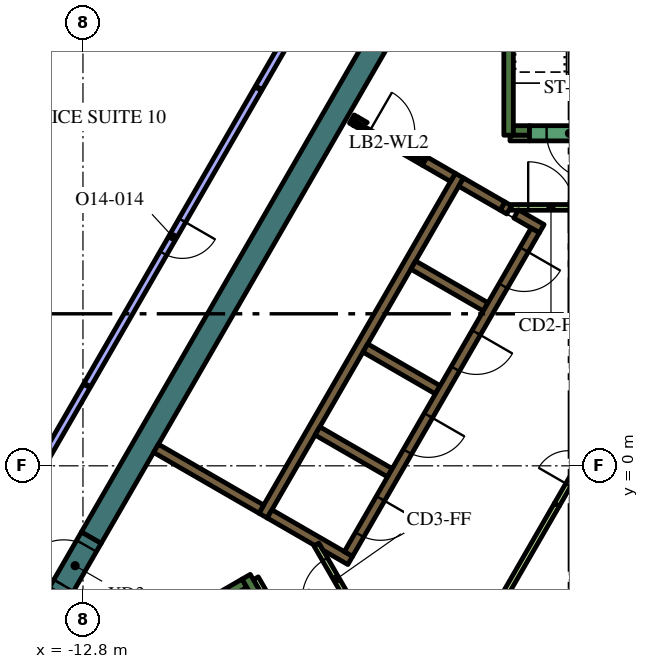
"""IFC4 building model, lengths in metres.
Left out: names, types, materials, properties, quantities, classifications, styles, units other than length and angle.
Written with IfcOpenShell. Run it as: python <this file> out.ifc"""

import sys

from ifc_helpers import new_model, si_unit, direction, frame, frame_2d, origin, place, context, subcontext, project, spatial, polyline, rectangle, outline, extrude, element, fill, save


model = new_model("IFC4")
c1 = context("Model", 3, precision=1e-05, world=origin(), true_north=direction((0.0, 1.0)))
c2 = subcontext(c1, "Body", "Model", "MODEL_VIEW")
j1 = project(units=[si_unit("LENGTHUNIT", "METRE"), si_unit("PLANEANGLEUNIT", "RADIAN")], contexts=[c1])
p1 = place(None, origin())
s1 = spatial("IfcSite", under=j1, at=p1, CompositionType="ELEMENT")
p2 = place(p1, origin())
s2 = spatial("IfcBuilding", under=s1, at=p2, CompositionType="ELEMENT")
p3 = place(p2, frame((0.0, 0.0, 313.2)))
s3 = spatial("IfcBuildingStorey", under=s2, at=p3, CompositionType="ELEMENT", Elevation=313.2)
p4 = place(p3, frame((-13.432, -3.364, 0.0), z_axis=(0.0, 0.0, 1.0), x_axis=(-0.499960127962, -0.866048422692, 0.0)))
e1 = element("IfcWall", 1, at=p4, inside=s3, PredefinedType="SOLIDWALL", context=c2, shape_type="SweptSolid", body=[
    extrude(rectangle(XDim=2.934, YDim=0.6, at=frame_2d((1.467, 0.0))), origin(), (0.0, 0.0, 1.0), 4.2),
])
p5 = place(p3, frame((-12.582, -1.892, 0.0), z_axis=(0.0, 0.0, 1.0), x_axis=(0.500003640647, 0.866023301845, 0.0)))
e2 = element("IfcWall", 2, at=p5, inside=s3, PredefinedType="SOLIDWALL", context=c2, shape_type="SweptSolid", body=[
    extrude(rectangle(XDim=15.858, YDim=0.6, at=frame_2d((7.929, 0.0))), origin(), (0.0, 0.0, 1.0), 4.2),
])
p6 = place(p3, frame((-1.6, 8.7, 0.0), z_axis=(0.0, 0.0, 1.0), x_axis=(0.0, 1.0, 0.0)))
e3 = element("IfcWall", 3, at=p6, inside=s3, PredefinedType="SOLIDWALL", context=c2, shape_type="SweptSolid", body=[
    extrude(rectangle(XDim=7.05, YDim=0.25, at=frame_2d((3.525, 0.0))), origin(), (0.0, 0.0, 1.0), 4.2),
])
p7 = place(p3, frame((-1.475, 8.825, 0.0), z_axis=(0.0, 0.0, 1.0), x_axis=(1.0, 0.0, 0.0)))
e4 = element("IfcWall", 4, at=p7, inside=s3, PredefinedType="SOLIDWALL", context=c2, shape_type="SweptSolid", body=[
    extrude(rectangle(XDim=0.425, YDim=0.25, at=frame_2d((0.212, 0.0))), origin(), (0.0, 0.0, 1.0), 4.2),
])
p8 = place(p3, frame((-14.44, -6.49, 0.0), z_axis=(0.0, 0.0, 1.0), x_axis=(0.866022966069, 0.500004222222, 0.0)))
e5 = element("IfcWall", 5, at=p8, inside=s3, PredefinedType="SOLIDWALL", context=c2, shape_type="SweptSolid", body=[
    extrude(rectangle(XDim=6.8, YDim=0.25, at=frame_2d((3.4, 0.0))), origin(), (0.0, 0.0, 1.0), 4.2),
])
p9 = place(p3, frame((-8.168, -3.503, 0.0), z_axis=(0.0, 0.0, 1.0), x_axis=(-0.499952099219, 0.866053057547, 0.0)))
e6 = element("IfcWall", 6, at=p9, inside=s3, PredefinedType="SOLIDWALL", context=c2, shape_type="SweptSolid", body=[
    extrude(rectangle(XDim=0.675, YDim=0.25, at=frame_2d((0.337, 0.0))), origin(), (0.0, 0.0, 1.0), 4.2),
])
p10 = place(p3, frame((-8.06, -1.311, 0.0), z_axis=(0.0, 0.0, 1.0), x_axis=(0.50000273126, 0.866023826885, 0.0)))
e7 = element("IfcWall", 7, at=p10, inside=s3, PredefinedType="SOLIDWALL", context=c2, shape_type="SweptSolid", body=[
    extrude(rectangle(XDim=10.33, YDim=0.25, at=frame_2d((5.165, 0.0))), origin(), (0.0, 0.0, 1.0), 4.2),
])
p11 = place(p3, frame((-1.758, 6.835, 0.0), z_axis=(0.0, 0.0, 1.0), x_axis=(0.865982457891, -0.500074377092, 0.0)))
e8 = element("IfcWall", 8, at=p11, inside=s3, PredefinedType="SOLIDWALL", context=c2, shape_type="SweptSolid", body=[
    extrude(rectangle(XDim=0.2, YDim=0.25, at=frame_2d((0.1, 0.0))), origin(), (0.0, 0.0, 1.0), 4.2),
])
p12 = place(p3, frame((-1.76, 6.836, 0.0), z_axis=(0.0, 0.0, 1.0), x_axis=(-0.865952863304, 0.500125622755, 0.0)))
e9 = element("IfcWall", 9, at=p12, inside=s3, PredefinedType="SOLIDWALL", context=c2, shape_type="SweptSolid", body=[
    extrude(rectangle(XDim=1.258, YDim=0.25, at=frame_2d((0.629, 0.0))), origin(), (0.0, 0.0, 1.0), 4.2),
])
p13 = place(p3, frame((-0.728, 6.24, 0.0), z_axis=(0.0, 0.0, 1.0), x_axis=(-0.865955664968, 0.500120771724, 0.0)))
e10 = element("IfcWall", 10, at=p13, inside=s3, PredefinedType="SOLIDWALL", context=c2, shape_type="SweptSolid", body=[
    extrude(rectangle(XDim=0.778, YDim=0.25, at=frame_2d((0.389, 0.0))), origin(), (0.0, 0.0, 1.0), 4.2),
])
for number, where, z_axis, x_axis in (
    (11, (-2.204, 4.182, 0.0), (0.0, 0.0, 1.0), (-0.866, 0.5, 0.0)),
    (12, (-5.369, 3.1, 0.0), (0.0, 0.0, 1.0), (0.866, -0.5, 0.0)),
    (13, (-4.724, -0.182, 0.0), (0.0, 0.0, 1.0), (-0.866, 0.5, 0.0)),
):
    element("IfcWall", number, at=place(p3, frame(where, z_axis=z_axis, x_axis=x_axis)), inside=s3, PredefinedType="SOLIDWALL", context=c2, shape_type="SweptSolid", body=[
        extrude(rectangle(XDim=2.2, YDim=0.25, at=frame_2d((1.1, 0.0))), origin(), (0.0, 0.0, 1.0), 4.2),
    ])
p14 = place(p3, origin())
e14 = element("IfcWall", 14, at=p14, inside=s3, PredefinedType="SOLIDWALL", context=c2, shape_type="SweptSolid", body=[
    extrude(outline(polyline([(-5.922, -2.257), (-5.922, -2.257), (-5.705, -2.382), (-5.83, -2.598), (-6.483, -2.221), (-6.591, -2.033), (-6.591, -2.033), (-6.7, -2.096), (-7.952, -1.373), (-7.827, -1.156), (-5.922, -2.257)])), origin(), (0.0, 0.0, 1.0), 4.2),
])
p15 = place(p3, frame((-8.106, -1.14, 0.0), z_axis=(0.0, 0.0, 1.0), x_axis=(-0.866008981251, 0.500028443584, 0.0)))
e15 = element("IfcWall", 15, at=p15, inside=s3, PredefinedType="SOLIDWALL", context=c2, shape_type="SweptSolid", body=[
    extrude(rectangle(XDim=3.2, YDim=0.25, at=frame_2d((1.6, 0.0))), origin(), (0.0, 0.0, 1.0), 4.2),
])
p16 = place(p3, frame((-5.725, 9.125, 0.0), z_axis=(0.0, 0.0, 1.0), x_axis=(0.866185586049, -0.49972245349, 0.0)))
e16 = element("IfcWall", 16, at=p16, inside=s3, PredefinedType="SOLIDWALL", context=c2, shape_type="SweptSolid", body=[
    extrude(rectangle(XDim=0.11, YDim=0.25, at=frame_2d((0.055, 0.0))), origin(), (0.0, 0.0, 1.0), 4.2),
])
p17 = place(p3, frame((-3.066, 7.59, 0.0), z_axis=(0.0, 0.0, 1.0), x_axis=(-0.866081358704, 0.49990307071, 0.0)))
e17 = element("IfcWall", 17, at=p17, inside=s3, PredefinedType="SOLIDWALL", context=c2, shape_type="SweptSolid", body=[
    extrude(rectangle(XDim=0.858, YDim=0.25, at=frame_2d((0.429, 0.0))), origin(), (0.0, 0.0, 1.0), 4.2),
])
e18 = element("IfcWall", 18, at=p14, inside=s3, PredefinedType="SOLIDWALL", context=c2, shape_type="SweptSolid", body=[
    extrude(outline(polyline([(-3.748, 8.128), (-3.813, 8.015), (-4.027, 8.139), (-4.017, 8.156), (-4.008, 8.173), (-4.0, 8.192), (-3.995, 8.21), (-3.991, 8.23), (-3.99, 8.25), (-3.99, 8.268), (-3.748, 8.128)])), origin(), (0.0, 0.0, 1.0), 4.2),
])
e19 = element("IfcWall", 19, at=p14, inside=s3, PredefinedType="SOLIDWALL", context=c2, shape_type="SweptSolid", body=[
    extrude(outline(polyline([(-5.689, 8.96), (-5.69, 8.961), (-5.565, 9.177), (-5.319, 9.035), (-5.335, 9.026), (-5.351, 9.015), (-5.366, 9.002), (-5.379, 8.988), (-5.392, 8.972), (-5.402, 8.956), (-5.412, 8.939), (-5.629, 9.064), (-5.629, 9.064), (-5.689, 8.96)])), origin(), (0.0, 0.0, 1.0), 4.2),
])
for number, where, z_axis, x_axis in (
    (20, (-8.252, -2.958, 0.0), (0.0, 0.0, 1.0), (0.5, -0.866, 0.0)),
    (21, (-1.564, 8.625, 0.0), (0.0, 0.0, 1.0), (1.0, 0.0, 0.0)),
):
    element("IfcWall", number, at=place(p3, frame(where, z_axis=z_axis, x_axis=x_axis)), inside=s3, PredefinedType="PARTITIONING", context=c2, shape_type="SweptSolid", body=[
        extrude(rectangle(XDim=0.514, YDim=0.15, at=frame_2d((0.257, 0.0))), origin(), (0.0, 0.0, 1.0), 3.55),
    ])
p18 = place(p3, frame((-1.887, -3.718, 0.0), z_axis=(0.0, 0.0, 1.0), x_axis=(0.500043732237, 0.866000153493, 0.0)))
e22 = element("IfcWall", 22, at=p18, inside=s3, PredefinedType="PARTITIONING", context=c2, shape_type="SweptSolid", body=[
    extrude(rectangle(XDim=3.114, YDim=0.15, at=frame_2d((1.557, 0.0))), origin(), (0.0, 0.0, 1.0), 3.55),
])
p19 = place(p3, frame((-0.898, 6.194, 0.0), z_axis=(0.0, 0.0, 1.0), x_axis=(-0.499996202215, -0.866027596426, 0.0)))
e23 = element("IfcWall", 23, at=p19, inside=s3, PredefinedType="SOLIDWALL", context=c2, shape_type="SweptSolid", body=[
    extrude(rectangle(XDim=9.83, YDim=0.25, at=frame_2d((4.915, 0.0))), origin(), (0.0, 0.0, 1.0), 4.2),
])
p20 = place(p19, frame((0.585, 0.0, 0.0)))
e24 = element("IfcOpeningElement", 24, at=p20, cuts=e23, PredefinedType="OPENING", context=c2, shape_type="SweptSolid", body=[
    extrude(rectangle(XDim=1.1, YDim=2.1, at=frame_2d((0.55, 1.05))), frame((0.0, 0.135, 0.0), z_axis=(0.0, -1.0, 0.0), x_axis=(1.0, 0.0, 0.0)), (0.0, 0.0, 1.0), 0.27),
])
p21 = place(p19, frame((3.105, 0.0, 0.0)))
e25 = element("IfcOpeningElement", 25, at=p21, cuts=e23, PredefinedType="OPENING", context=c2, shape_type="SweptSolid", body=[
    extrude(rectangle(XDim=1.1, YDim=2.1, at=frame_2d((0.55, 1.05))), frame((0.0, 0.135, 0.0), z_axis=(0.0, -1.0, 0.0), x_axis=(1.0, 0.0, 0.0)), (0.0, 0.0, 1.0), 0.27),
])
p22 = place(p19, frame((5.625, 0.0, 0.0)))
e26 = element("IfcOpeningElement", 26, at=p22, cuts=e23, PredefinedType="OPENING", context=c2, shape_type="SweptSolid", body=[
    extrude(rectangle(XDim=1.1, YDim=2.1, at=frame_2d((0.55, 1.05))), frame((0.0, 0.135, 0.0), z_axis=(0.0, -1.0, 0.0), x_axis=(1.0, 0.0, 0.0)), (0.0, 0.0, 1.0), 0.27),
])
p23 = place(p19, frame((8.145, 0.0, 0.0)))
e27 = element("IfcOpeningElement", 27, at=p23, cuts=e23, PredefinedType="OPENING", context=c2, shape_type="SweptSolid", body=[
    extrude(rectangle(XDim=1.1, YDim=2.1, at=frame_2d((0.55, 1.05))), frame((0.0, 0.135, 0.0), z_axis=(0.0, -1.0, 0.0), x_axis=(1.0, 0.0, 0.0)), (0.0, 0.0, 1.0), 0.27),
])
p24 = place(p3, frame((1.05, 8.75, 0.0), z_axis=(0.0, 0.0, 1.0), x_axis=(-1.0, 0.0, 0.0)))
e28 = element("IfcWall", 28, at=p24, inside=s3, PredefinedType="SOLIDWALL", context=c2, shape_type="SweptSolid", body=[
    extrude(rectangle(XDim=2.1, YDim=0.4, at=frame_2d((1.05, 0.0))), origin(), (0.0, 0.0, 1.0), 4.2),
])
p25 = place(p24, frame((0.45, 0.0, 0.0)))
e29 = element("IfcOpeningElement", 29, at=p25, cuts=e28, PredefinedType="OPENING", context=c2, shape_type="SweptSolid", body=[
    extrude(rectangle(XDim=1.2, YDim=2.1, at=frame_2d((0.6, 1.05))), frame((0.0, 0.21, 0.0), z_axis=(0.0, -1.0, 0.0), x_axis=(1.0, 0.0, 0.0)), (0.0, 0.0, 1.0), 0.42),
])
p26 = place(p3, frame((-0.33, -1.022, 0.0), z_axis=(0.0, 0.0, 1.0), x_axis=(0.500027713859, 0.866009402589, 0.0)))
e30 = element("IfcWall", 30, at=p26, inside=s3, PredefinedType="PARTITIONING", context=c2, shape_type="SweptSolid", body=[
    extrude(rectangle(XDim=2.1, YDim=0.15, at=frame_2d((1.05, 0.0))), origin(), (0.0, 0.0, 1.0), 3.55),
])
p27 = place(p26, frame((0.6, 0.0, 0.0)))
e31 = element("IfcOpeningElement", 31, at=p27, cuts=e30, PredefinedType="OPENING", context=c2, shape_type="SweptSolid", body=[
    extrude(rectangle(XDim=0.9, YDim=2.1, at=frame_2d((0.45, 1.05))), frame((0.0, 0.085, 0.0), z_axis=(0.0, -1.0, 0.0), x_axis=(1.0, 0.0, 0.0)), (0.0, 0.0, 1.0), 0.17),
])
p28 = place(p3, frame((-1.534, 6.8, 0.0), z_axis=(0.0, 0.0, 1.0), x_axis=(1.0, 0.0, 0.0)))
e32 = element("IfcWall", 32, at=p28, inside=s3, PredefinedType="PARTITIONING", context=c2, shape_type="SweptSolid", body=[
    extrude(rectangle(XDim=2.1, YDim=0.15, at=frame_2d((1.05, 0.0))), origin(), (0.0, 0.0, 1.0), 3.55),
])
p29 = place(p28, frame((0.45, 0.0, 0.0)))
e33 = element("IfcOpeningElement", 33, at=p29, cuts=e32, PredefinedType="OPENING", context=c2, shape_type="SweptSolid", body=[
    extrude(rectangle(XDim=1.2, YDim=2.1, at=frame_2d((0.6, 1.05))), frame((0.0, 0.085, 0.0), z_axis=(0.0, -1.0, 0.0), x_axis=(1.0, 0.0, 0.0)), (0.0, 0.0, 1.0), 0.17),
])
p30 = place(p3, frame((-5.606, -3.89, 0.0), z_axis=(0.0, 0.0, 1.0), x_axis=(-0.500027713859, 0.866009402589, 0.0)))
e34 = element("IfcWall", 34, at=p30, inside=s3, PredefinedType="PARTITIONING", context=c2, shape_type="SweptSolid", body=[
    extrude(rectangle(XDim=2.1, YDim=0.15, at=frame_2d((1.05, 0.0))), origin(), (0.0, 0.0, 1.0), 3.55),
])
p31 = place(p30, frame((0.45, 0.0, 0.0)))
e35 = element("IfcOpeningElement", 35, at=p31, cuts=e34, PredefinedType="OPENING", context=c2, shape_type="SweptSolid", body=[
    extrude(rectangle(XDim=1.2, YDim=2.1, at=frame_2d((0.6, 1.05))), frame((0.0, 0.085, 0.0), z_axis=(0.0, -1.0, 0.0), x_axis=(1.0, 0.0, 0.0)), (0.0, 0.0, 1.0), 0.17),
])
p32 = place(p3, frame((-5.659, 9.012, 0.0), z_axis=(0.0, 0.0, 1.0), x_axis=(0.866009402589, -0.500027713859, 0.0)))
e36 = element("IfcWall", 36, at=p32, inside=s3, PredefinedType="PARTITIONING", context=c2, shape_type="SweptSolid", body=[
    extrude(rectangle(XDim=2.1, YDim=0.12, at=frame_2d((1.05, 0.0))), origin(), (0.0, 0.0, 1.0), 3.55),
])
p33 = place(p32, frame((0.45, 0.0, 0.0)))
e37 = element("IfcOpeningElement", 37, at=p33, cuts=e36, PredefinedType="OPENING", context=c2, shape_type="SweptSolid", body=[
    extrude(rectangle(XDim=1.2, YDim=2.1, at=frame_2d((0.6, 1.05))), frame((0.0, 0.07, 0.0), z_axis=(0.0, -1.0, 0.0), x_axis=(1.0, 0.0, 0.0)), (0.0, 0.0, 1.0), 0.14),
])
p34 = place(p3, frame((-13.432, -3.364, 0.0), z_axis=(0.0, 0.0, 1.0), x_axis=(0.500062241894, 0.865989465428, 0.0)))
e38 = element("IfcWall", 38, at=p34, inside=s3, PredefinedType="SOLIDWALL", context=c2, shape_type="SweptSolid", body=[
    extrude(rectangle(XDim=1.7, YDim=0.6, at=frame_2d((0.85, 0.0))), origin(), (0.0, 0.0, 1.0), 4.2),
])
p35 = place(p34, frame((0.25, 0.0, 0.0)))
e39 = element("IfcOpeningElement", 39, at=p35, cuts=e38, PredefinedType="OPENING", context=c2, shape_type="SweptSolid", body=[
    extrude(rectangle(XDim=1.2, YDim=2.1, at=frame_2d((0.6, 1.05))), frame((0.0, 0.31, 0.0), z_axis=(0.0, -1.0, 0.0), x_axis=(1.0, 0.0, 0.0)), (0.0, 0.0, 1.0), 0.62),
])
p36 = place(p3, frame((-8.186, 9.922, 0.0), z_axis=(0.0, 0.0, 1.0), x_axis=(-0.5000018851, -0.866024315419, 0.0)))
e40 = element("IfcWall", 40, at=p36, inside=s3, PredefinedType="PARTITIONING", context=c2, shape_type="SweptSolid", body=[
    extrude(rectangle(XDim=9.0, YDim=0.2, at=frame_2d((4.5, 0.0))), origin(), (0.0, 0.0, 1.0), 3.55),
])
p37 = place(p36, frame((4.0, 0.0, 0.0)))
e41 = element("IfcOpeningElement", 41, at=p37, cuts=e40, PredefinedType="OPENING", context=c2, shape_type="SweptSolid", body=[
    extrude(rectangle(XDim=1.0, YDim=2.1, at=frame_2d((0.5, 1.05))), frame((0.0, 0.11, 0.0), z_axis=(0.0, -1.0, 0.0), x_axis=(1.0, 0.0, 0.0)), (0.0, 0.0, 1.0), 0.22),
])
p38 = place(p3, frame((-12.701, 2.102, 0.0), z_axis=(0.0, 0.0, 1.0), x_axis=(-0.499974782844, -0.866039962427, 0.0)))
e42 = element("IfcWall", 42, at=p38, inside=s3, PredefinedType="PARTITIONING", context=c2, shape_type="SweptSolid", body=[
    extrude(rectangle(XDim=4.997, YDim=0.2, at=frame_2d((2.499, 0.0))), origin(), (0.0, 0.0, 1.0), 3.55),
])
p39 = place(p3, frame((-7.275, 11.499, 0.0), z_axis=(0.0, 0.0, 1.0), x_axis=(-0.500025407441, -0.866010734295, 0.0)))
e43 = element("IfcWall", 43, at=p39, inside=s3, PredefinedType="PARTITIONING", context=c2, shape_type="SweptSolid", body=[
    extrude(rectangle(XDim=1.791, YDim=0.2, at=frame_2d((0.895, 0.0))), origin(), (0.0, 0.0, 1.0), 3.55),
])
p40 = place(p20, origin())
e44 = element("IfcDoor", 44, at=p40, inside=s3, OperationType="DOUBLE_DOOR_SLIDING", PredefinedType="DOOR", context=c2, shape_type="SweptSolid", body=[
    extrude(rectangle(XDim=1.1, YDim=2.1, at=frame_2d((0.55, 1.05))), frame((0.0, 0.025, 0.0), z_axis=(0.0, -1.0, 0.0), x_axis=(1.0, 0.0, 0.0)), (0.0, 0.0, 1.0), 0.05),
])
fill(e24, e44)
p41 = place(p21, origin())
e45 = element("IfcDoor", 45, at=p41, inside=s3, OperationType="DOUBLE_DOOR_SLIDING", PredefinedType="DOOR", context=c2, shape_type="SweptSolid", body=[
    extrude(rectangle(XDim=1.1, YDim=2.1, at=frame_2d((0.55, 1.05))), frame((0.0, 0.025, 0.0), z_axis=(0.0, -1.0, 0.0), x_axis=(1.0, 0.0, 0.0)), (0.0, 0.0, 1.0), 0.05),
])
fill(e25, e45)
p42 = place(p22, origin())
e46 = element("IfcDoor", 46, at=p42, inside=s3, OperationType="DOUBLE_DOOR_SLIDING", PredefinedType="DOOR", context=c2, shape_type="SweptSolid", body=[
    extrude(rectangle(XDim=1.1, YDim=2.1, at=frame_2d((0.55, 1.05))), frame((0.0, 0.025, 0.0), z_axis=(0.0, -1.0, 0.0), x_axis=(1.0, 0.0, 0.0)), (0.0, 0.0, 1.0), 0.05),
])
fill(e26, e46)
p43 = place(p23, origin())
e47 = element("IfcDoor", 47, at=p43, inside=s3, OperationType="DOUBLE_DOOR_SLIDING", PredefinedType="DOOR", context=c2, shape_type="SweptSolid", body=[
    extrude(rectangle(XDim=1.1, YDim=2.1, at=frame_2d((0.55, 1.05))), frame((0.0, 0.025, 0.0), z_axis=(0.0, -1.0, 0.0), x_axis=(1.0, 0.0, 0.0)), (0.0, 0.0, 1.0), 0.05),
])
fill(e27, e47)
p44 = place(p25, origin())
e48 = element("IfcDoor", 48, at=p44, inside=s3, OperationType="SINGLE_SWING_LEFT", PredefinedType="DOOR", context=c2, shape_type="SweptSolid", body=[
    extrude(rectangle(XDim=1.2, YDim=2.1, at=frame_2d((0.6, 1.05))), frame((0.0, 0.025, 0.0), z_axis=(0.0, -1.0, 0.0), x_axis=(1.0, 0.0, 0.0)), (0.0, 0.0, 1.0), 0.05),
])
fill(e29, e48)
p45 = place(p27, origin())
e49 = element("IfcDoor", 49, at=p45, inside=s3, OperationType="SINGLE_SWING_LEFT", PredefinedType="DOOR", context=c2, shape_type="SweptSolid", body=[
    extrude(rectangle(XDim=0.9, YDim=2.1, at=frame_2d((0.45, 1.05))), frame((0.0, 0.025, 0.0), z_axis=(0.0, -1.0, 0.0), x_axis=(1.0, 0.0, 0.0)), (0.0, 0.0, 1.0), 0.05),
])
fill(e31, e49)
p46 = place(p29, origin())
e50 = element("IfcDoor", 50, at=p46, inside=s3, OperationType="SINGLE_SWING_LEFT", PredefinedType="DOOR", context=c2, shape_type="SweptSolid", body=[
    extrude(rectangle(XDim=1.2, YDim=2.1, at=frame_2d((0.6, 1.05))), frame((0.0, 0.025, 0.0), z_axis=(0.0, -1.0, 0.0), x_axis=(1.0, 0.0, 0.0)), (0.0, 0.0, 1.0), 0.05),
])
fill(e33, e50)
p47 = place(p31, origin())
e51 = element("IfcDoor", 51, at=p47, inside=s3, OperationType="SINGLE_SWING_LEFT", PredefinedType="DOOR", context=c2, shape_type="SweptSolid", body=[
    extrude(rectangle(XDim=1.2, YDim=2.1, at=frame_2d((0.6, 1.05))), frame((0.0, 0.025, 0.0), z_axis=(0.0, -1.0, 0.0), x_axis=(1.0, 0.0, 0.0)), (0.0, 0.0, 1.0), 0.05),
])
fill(e35, e51)
p48 = place(p33, origin())
e52 = element("IfcDoor", 52, at=p48, inside=s3, OperationType="SINGLE_SWING_LEFT", PredefinedType="DOOR", context=c2, shape_type="SweptSolid", body=[
    extrude(rectangle(XDim=1.2, YDim=2.1, at=frame_2d((0.6, 1.05))), frame((0.0, 0.025, 0.0), z_axis=(0.0, -1.0, 0.0), x_axis=(1.0, 0.0, 0.0)), (0.0, 0.0, 1.0), 0.05),
])
fill(e37, e52)
p49 = place(p35, origin())
e53 = element("IfcDoor", 53, at=p49, inside=s3, OperationType="SINGLE_SWING_LEFT", PredefinedType="DOOR", context=c2, shape_type="SweptSolid", body=[
    extrude(rectangle(XDim=1.2, YDim=2.1, at=frame_2d((0.6, 1.05))), frame((0.0, 0.025, 0.0), z_axis=(0.0, -1.0, 0.0), x_axis=(1.0, 0.0, 0.0)), (0.0, 0.0, 1.0), 0.05),
])
fill(e39, e53)
p50 = place(p37, origin())
e54 = element("IfcDoor", 54, at=p50, inside=s3, OperationType="SINGLE_SWING_LEFT", PredefinedType="DOOR", context=c2, shape_type="SweptSolid", body=[
    extrude(rectangle(XDim=1.0, YDim=2.1, at=frame_2d((0.5, 1.05))), frame((0.0, 0.025, 0.0), z_axis=(0.0, -1.0, 0.0), x_axis=(1.0, 0.0, 0.0)), (0.0, 0.0, 1.0), 0.05),
])
fill(e41, e54)
save(model, sys.argv[1])
